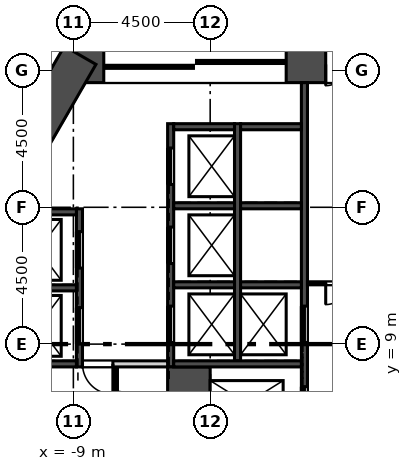
"""IFC4 building model, lengths in metres.
Left out: names, types, materials, properties, quantities, classifications, styles, units other than length and angle.
Written with IfcOpenShell. Run it as: python <this file> out.ifc"""

import sys

from ifc_helpers import new_model, si_unit, direction, frame, frame_2d, origin, place, context, subcontext, project, spatial, rectangle, extrude, element, fill, save


model = new_model("IFC4")
c1 = context("Model", 3, precision=1e-05, world=origin(), true_north=direction((0.0, 1.0)))
c2 = subcontext(c1, "Body", "Model", "MODEL_VIEW")
j1 = project(units=[si_unit("LENGTHUNIT", "METRE"), si_unit("PLANEANGLEUNIT", "RADIAN")], contexts=[c1])
p1 = place(None, origin())
s1 = spatial("IfcSite", under=j1, at=p1, CompositionType="ELEMENT")
p2 = place(p1, origin())
s2 = spatial("IfcBuilding", under=s1, at=p2, CompositionType="ELEMENT")
p3 = place(p2, frame((0.0, 0.0, 132.1)))
s3 = spatial("IfcBuildingStorey", under=s2, at=p3, CompositionType="ELEMENT", Elevation=132.1)
p4 = place(p3, frame((9.296, 18.2, 0.0), z_axis=(0.0, 0.0, 1.0), x_axis=(-1.0, 0.0, 0.0)))
e1 = element("IfcWall", 1, at=p4, inside=s3, PredefinedType="SHEAR", context=c2, shape_type="SweptSolid", body=[
    extrude(rectangle(XDim=18.592, YDim=1.2, at=frame_2d((9.296, 0.0))), origin(), (0.0, 0.0, 1.0), 5.4),
])
p5 = place(p4, frame((8.596, 0.0, 0.0)))
e2 = element("IfcOpeningElement", 2, at=p5, cuts=e1, PredefinedType="OPENING", context=c2, shape_type="SweptSolid", body=[
    extrude(rectangle(XDim=1.4, YDim=2.1, at=frame_2d((0.7, 1.05))), frame((0.0, 0.61, 0.0), z_axis=(0.0, -1.0, 0.0), x_axis=(1.0, 0.0, 0.0)), (0.0, 0.0, 1.0), 1.22),
])
p6 = place(p4, frame((11.296, 0.0, 0.0)))
e3 = element("IfcOpeningElement", 3, at=p6, cuts=e1, PredefinedType="OPENING", context=c2, shape_type="SweptSolid", body=[
    extrude(rectangle(XDim=6.0, YDim=2.4, at=frame_2d((3.0, 1.2))), frame((0.0, 0.61, 0.0), z_axis=(0.0, -1.0, 0.0), x_axis=(1.0, 0.0, 0.0)), (0.0, 0.0, 1.0), 1.22),
])
p7 = place(p4, frame((1.296, 0.0, 0.0)))
e4 = element("IfcOpeningElement", 4, at=p7, cuts=e1, PredefinedType="OPENING", context=c2, shape_type="SweptSolid", body=[
    extrude(rectangle(XDim=6.0, YDim=2.4, at=frame_2d((3.0, 1.2))), frame((0.0, 0.61, 0.0), z_axis=(0.0, -1.0, 0.0), x_axis=(1.0, 0.0, 0.0)), (0.0, 0.0, 1.0), 1.22),
])
p8 = place(p3, frame((-8.777, 18.5, 0.0), z_axis=(0.0, 0.0, 1.0), x_axis=(-0.499998513025, -0.866026262288, 0.0)))
e5 = element("IfcWall", 5, at=p8, inside=s3, PredefinedType="SHEAR", context=c2, shape_type="SweptSolid", body=[
    extrude(rectangle(XDim=9.008, YDim=1.2, at=frame_2d((4.504, 0.0))), origin(), (0.0, 0.0, 1.0), 5.4),
])
p9 = place(p3, frame((-4.353, 51.692, 0.0), z_axis=(0.0, 0.0, 1.0), x_axis=(-0.500000700546, -0.866024999324, 0.0)))
e6 = element("IfcWall", 6, at=p9, inside=s3, PredefinedType="SOLIDWALL", context=c2, shape_type="SweptSolid", body=[
    extrude(rectangle(XDim=50.787, YDim=0.34, at=frame_2d((25.393, 0.0))), origin(), (0.0, 0.0, 1.0), 5.0),
])
p10 = place(p9, frame((3.59, 0.0, 0.9)))
e7 = element("IfcOpeningElement", 7, at=p10, cuts=e6, PredefinedType="OPENING", context=c2, shape_type="SweptSolid", body=[
    extrude(rectangle(XDim=1.885, YDim=3.0, at=frame_2d((0.942, 1.5))), frame((0.0, 0.18, 0.0), z_axis=(0.0, -1.0, 0.0), x_axis=(1.0, 0.0, 0.0)), (0.0, 0.0, 1.0), 0.36),
])
p11 = place(p9, frame((6.59, 0.0, 0.9)))
e8 = element("IfcOpeningElement", 8, at=p11, cuts=e6, PredefinedType="OPENING", context=c2, shape_type="SweptSolid", body=[
    extrude(rectangle(XDim=1.885, YDim=3.0, at=frame_2d((0.942, 1.5))), frame((0.0, 0.18, 0.0), z_axis=(0.0, -1.0, 0.0), x_axis=(1.0, 0.0, 0.0)), (0.0, 0.0, 1.0), 0.36),
])
p12 = place(p9, frame((9.59, 0.0, 0.9)))
e9 = element("IfcOpeningElement", 9, at=p12, cuts=e6, PredefinedType="OPENING", context=c2, shape_type="SweptSolid", body=[
    extrude(rectangle(XDim=1.885, YDim=3.0, at=frame_2d((0.942, 1.5))), frame((0.0, 0.18, 0.0), z_axis=(0.0, -1.0, 0.0), x_axis=(1.0, 0.0, 0.0)), (0.0, 0.0, 1.0), 0.36),
])
p13 = place(p9, frame((12.59, 0.0, 0.9)))
e10 = element("IfcOpeningElement", 10, at=p13, cuts=e6, PredefinedType="OPENING", context=c2, shape_type="SweptSolid", body=[
    extrude(rectangle(XDim=1.885, YDim=3.0, at=frame_2d((0.942, 1.5))), frame((0.0, 0.18, 0.0), z_axis=(0.0, -1.0, 0.0), x_axis=(1.0, 0.0, 0.0)), (0.0, 0.0, 1.0), 0.36),
])
p14 = place(p9, frame((15.59, 0.0, 0.9)))
e11 = element("IfcOpeningElement", 11, at=p14, cuts=e6, PredefinedType="OPENING", context=c2, shape_type="SweptSolid", body=[
    extrude(rectangle(XDim=1.885, YDim=3.0, at=frame_2d((0.942, 1.5))), frame((0.0, 0.18, 0.0), z_axis=(0.0, -1.0, 0.0), x_axis=(1.0, 0.0, 0.0)), (0.0, 0.0, 1.0), 0.36),
])
p15 = place(p9, frame((18.59, 0.0, 0.9)))
e12 = element("IfcOpeningElement", 12, at=p15, cuts=e6, PredefinedType="OPENING", context=c2, shape_type="SweptSolid", body=[
    extrude(rectangle(XDim=1.885, YDim=3.0, at=frame_2d((0.942, 1.5))), frame((0.0, 0.18, 0.0), z_axis=(0.0, -1.0, 0.0), x_axis=(1.0, 0.0, 0.0)), (0.0, 0.0, 1.0), 0.36),
])
p16 = place(p9, frame((21.59, 0.0, 0.9)))
e13 = element("IfcOpeningElement", 13, at=p16, cuts=e6, PredefinedType="OPENING", context=c2, shape_type="SweptSolid", body=[
    extrude(rectangle(XDim=1.885, YDim=3.0, at=frame_2d((0.942, 1.5))), frame((0.0, 0.18, 0.0), z_axis=(0.0, -1.0, 0.0), x_axis=(1.0, 0.0, 0.0)), (0.0, 0.0, 1.0), 0.36),
])
p17 = place(p9, frame((24.59, 0.0, 0.9)))
e14 = element("IfcOpeningElement", 14, at=p17, cuts=e6, PredefinedType="OPENING", context=c2, shape_type="SweptSolid", body=[
    extrude(rectangle(XDim=1.885, YDim=3.0, at=frame_2d((0.942, 1.5))), frame((0.0, 0.18, 0.0), z_axis=(0.0, -1.0, 0.0), x_axis=(1.0, 0.0, 0.0)), (0.0, 0.0, 1.0), 0.36),
])
p18 = place(p9, frame((27.59, 0.0, 0.9)))
e15 = element("IfcOpeningElement", 15, at=p18, cuts=e6, PredefinedType="OPENING", context=c2, shape_type="SweptSolid", body=[
    extrude(rectangle(XDim=1.885, YDim=3.0, at=frame_2d((0.942, 1.5))), frame((0.0, 0.18, 0.0), z_axis=(0.0, -1.0, 0.0), x_axis=(1.0, 0.0, 0.0)), (0.0, 0.0, 1.0), 0.36),
])
p19 = place(p9, frame((30.59, 0.0, 0.9)))
e16 = element("IfcOpeningElement", 16, at=p19, cuts=e6, PredefinedType="OPENING", context=c2, shape_type="SweptSolid", body=[
    extrude(rectangle(XDim=1.885, YDim=3.0, at=frame_2d((0.942, 1.5))), frame((0.0, 0.18, 0.0), z_axis=(0.0, -1.0, 0.0), x_axis=(1.0, 0.0, 0.0)), (0.0, 0.0, 1.0), 0.36),
])
p20 = place(p9, frame((33.59, 0.0, 0.9)))
e17 = element("IfcOpeningElement", 17, at=p20, cuts=e6, PredefinedType="OPENING", context=c2, shape_type="SweptSolid", body=[
    extrude(rectangle(XDim=1.885, YDim=3.0, at=frame_2d((0.942, 1.5))), frame((0.0, 0.18, 0.0), z_axis=(0.0, -1.0, 0.0), x_axis=(1.0, 0.0, 0.0)), (0.0, 0.0, 1.0), 0.36),
])
p21 = place(p9, frame((36.59, 0.0, 0.9)))
e18 = element("IfcOpeningElement", 18, at=p21, cuts=e6, PredefinedType="OPENING", context=c2, shape_type="SweptSolid", body=[
    extrude(rectangle(XDim=1.885, YDim=3.0, at=frame_2d((0.942, 1.5))), frame((0.0, 0.18, 0.0), z_axis=(0.0, -1.0, 0.0), x_axis=(1.0, 0.0, 0.0)), (0.0, 0.0, 1.0), 0.36),
])
p22 = place(p9, frame((39.59, 0.0, 0.9)))
e19 = element("IfcOpeningElement", 19, at=p22, cuts=e6, PredefinedType="OPENING", context=c2, shape_type="SweptSolid", body=[
    extrude(rectangle(XDim=1.885, YDim=3.0, at=frame_2d((0.942, 1.5))), frame((0.0, 0.18, 0.0), z_axis=(0.0, -1.0, 0.0), x_axis=(1.0, 0.0, 0.0)), (0.0, 0.0, 1.0), 0.36),
])
p23 = place(p9, frame((42.59, 0.0, 0.9)))
e20 = element("IfcOpeningElement", 20, at=p23, cuts=e6, PredefinedType="OPENING", context=c2, shape_type="SweptSolid", body=[
    extrude(rectangle(XDim=1.885, YDim=3.0, at=frame_2d((0.942, 1.5))), frame((0.0, 0.18, 0.0), z_axis=(0.0, -1.0, 0.0), x_axis=(1.0, 0.0, 0.0)), (0.0, 0.0, 1.0), 0.36),
])
p24 = place(p9, frame((45.59, 0.0, 0.9)))
e21 = element("IfcOpeningElement", 21, at=p24, cuts=e6, PredefinedType="OPENING", context=c2, shape_type="SweptSolid", body=[
    extrude(rectangle(XDim=1.885, YDim=3.0, at=frame_2d((0.942, 1.5))), frame((0.0, 0.18, 0.0), z_axis=(0.0, -1.0, 0.0), x_axis=(1.0, 0.0, 0.0)), (0.0, 0.0, 1.0), 0.36),
])
p25 = place(p3, frame((-8.8, 8.25, -0.4), z_axis=(0.0, 0.0, 1.0), x_axis=(0.0, 1.0, 0.0)))
e22 = element("IfcWall", 22, at=p25, inside=s3, PredefinedType="SOLIDWALL", context=c2, shape_type="SweptSolid", body=[
    extrude(rectangle(XDim=5.2, YDim=0.2, at=frame_2d((2.6, 0.0))), origin(), (0.0, 0.0, 1.0), 5.4),
])
p26 = place(p25, frame((0.75, 0.0, 0.4)))
e23 = element("IfcOpeningElement", 23, at=p26, cuts=e22, PredefinedType="OPENING", context=c2, shape_type="SweptSolid", body=[
    extrude(rectangle(XDim=1.2, YDim=2.1, at=frame_2d((0.6, 1.05))), frame((0.0, 0.11, 0.0), z_axis=(0.0, -1.0, 0.0), x_axis=(1.0, 0.0, 0.0)), (0.0, 0.0, 1.0), 0.22),
])
p27 = place(p25, frame((3.25, 0.0, 0.4)))
e24 = element("IfcOpeningElement", 24, at=p27, cuts=e22, PredefinedType="OPENING", context=c2, shape_type="SweptSolid", body=[
    extrude(rectangle(XDim=1.2, YDim=2.1, at=frame_2d((0.6, 1.05))), frame((0.0, 0.11, 0.0), z_axis=(0.0, -1.0, 0.0), x_axis=(1.0, 0.0, 0.0)), (0.0, 0.0, 1.0), 0.22),
])
p28 = place(p3, frame((-5.8, 8.25, -0.4), z_axis=(0.0, 0.0, 1.0), x_axis=(0.0, 1.0, 0.0)))
e25 = element("IfcWall", 25, at=p28, inside=s3, PredefinedType="SOLIDWALL", context=c2, shape_type="SweptSolid", body=[
    extrude(rectangle(XDim=8.0, YDim=0.2, at=frame_2d((4.0, 0.0))), origin(), (0.0, 0.0, 1.0), 5.4),
])
p29 = place(p28, frame((0.8, 0.0, 0.4)))
e26 = element("IfcOpeningElement", 26, at=p29, cuts=e25, PredefinedType="OPENING", context=c2, shape_type="SweptSolid", body=[
    extrude(rectangle(XDim=1.2, YDim=2.1, at=frame_2d((0.6, 1.05))), frame((0.0, 0.11, 0.0), z_axis=(0.0, -1.0, 0.0), x_axis=(1.0, 0.0, 0.0)), (0.0, 0.0, 1.0), 0.22),
])
p30 = place(p28, frame((3.4, 0.0, 0.4)))
e27 = element("IfcOpeningElement", 27, at=p30, cuts=e25, PredefinedType="OPENING", context=c2, shape_type="SweptSolid", body=[
    extrude(rectangle(XDim=1.2, YDim=2.1, at=frame_2d((0.6, 1.05))), frame((0.0, 0.11, 0.0), z_axis=(0.0, -1.0, 0.0), x_axis=(1.0, 0.0, 0.0)), (0.0, 0.0, 1.0), 0.22),
])
p31 = place(p28, frame((6.0, 0.0, 0.4)))
e28 = element("IfcOpeningElement", 28, at=p31, cuts=e25, PredefinedType="OPENING", context=c2, shape_type="SweptSolid", body=[
    extrude(rectangle(XDim=1.2, YDim=2.1, at=frame_2d((0.6, 1.05))), frame((0.0, 0.11, 0.0), z_axis=(0.0, -1.0, 0.0), x_axis=(1.0, 0.0, 0.0)), (0.0, 0.0, 1.0), 0.22),
])
p32 = place(p3, frame((-3.6, 8.45, -0.4), z_axis=(0.0, 0.0, 1.0), x_axis=(0.0, 1.0, 0.0)))
e29 = element("IfcWall", 29, at=p32, inside=s3, PredefinedType="SOLIDWALL", context=c2, shape_type="SweptSolid", body=[
    extrude(rectangle(XDim=7.8, YDim=0.2, at=frame_2d((3.9, 0.0))), origin(), (0.0, 0.0, 1.0), 5.4),
])
p33 = place(p3, frame((-1.4, 5.85, -0.4), z_axis=(0.0, 0.0, 1.0), x_axis=(0.0, 1.0, 0.0)))
e30 = element("IfcWall", 30, at=p33, inside=s3, PredefinedType="SOLIDWALL", context=c2, shape_type="SweptSolid", body=[
    extrude(rectangle(XDim=11.75, YDim=0.2, at=frame_2d((5.875, 0.0))), origin(), (0.0, 0.0, 1.0), 5.4),
])
p34 = place(p33, frame((3.2, 0.0, 0.4)))
e31 = element("IfcOpeningElement", 31, at=p34, cuts=e30, PredefinedType="OPENING", context=c2, shape_type="SweptSolid", body=[
    extrude(rectangle(XDim=1.2, YDim=2.1, at=frame_2d((0.6, 1.05))), frame((0.0, 0.11, 0.0), z_axis=(0.0, -1.0, 0.0), x_axis=(1.0, 0.0, 0.0)), (0.0, 0.0, 1.0), 0.22),
])
p35 = place(p33, frame((0.65, 0.0, 0.4)))
e32 = element("IfcOpeningElement", 32, at=p35, cuts=e30, PredefinedType="OPENING", context=c2, shape_type="SweptSolid", body=[
    extrude(rectangle(XDim=1.1, YDim=2.1, at=frame_2d((0.55, 1.05))), frame((0.0, 0.11, 0.0), z_axis=(0.0, -1.0, 0.0), x_axis=(1.0, 0.0, 0.0)), (0.0, 0.0, 1.0), 0.22),
])
p36 = place(p3, frame((-5.2, 5.85, -0.4), z_axis=(0.0, 0.0, 1.0), x_axis=(0.0, 1.0, 0.0)))
e33 = element("IfcWall", 33, at=p36, inside=s3, PredefinedType="SOLIDWALL", context=c2, shape_type="SweptSolid", body=[
    extrude(rectangle(XDim=2.4, YDim=1.4, at=frame_2d((1.2, 0.0))), origin(), (0.0, 0.0, 1.0), 5.4),
])
p37 = place(p3, frame((-10.9, 8.35, -0.4), z_axis=(0.0, 0.0, 1.0), x_axis=(1.0, 0.0, 0.0)))
e34 = element("IfcWall", 34, at=p37, inside=s3, PredefinedType="SOLIDWALL", context=c2, shape_type="SweptSolid", body=[
    extrude(rectangle(XDim=2.0, YDim=0.2, at=frame_2d((1.0, 0.0))), origin(), (0.0, 0.0, 1.0), 5.4),
])
p38 = place(p3, frame((-5.7, 8.35, -0.4), z_axis=(0.0, 0.0, 1.0), x_axis=(1.0, 0.0, 0.0)))
e35 = element("IfcWall", 35, at=p38, inside=s3, PredefinedType="SOLIDWALL", context=c2, shape_type="SweptSolid", body=[
    extrude(rectangle(XDim=4.2, YDim=0.2, at=frame_2d((2.1, 0.0))), origin(), (0.0, 0.0, 1.0), 5.4),
])
for number, where, z_axis, x_axis in (
    (36, (-10.9, 10.85, -0.4), (0.0, 0.0, 1.0), (1.0, 0.0, 0.0)),
    (37, (-10.9, 13.35, -0.4), (0.0, 0.0, 1.0), (1.0, 0.0, 0.0)),
    (38, (-5.7, 10.95, -0.4), (0.0, 0.0, 1.0), (1.0, 0.0, 0.0)),
    (39, (-5.7, 13.55, -0.4), (0.0, 0.0, 1.0), (1.0, 0.0, 0.0)),
    (40, (-5.7, 16.15, -0.4), (0.0, 0.0, 1.0), (1.0, 0.0, 0.0)),
    (41, (-3.5, 10.95, -0.4), (0.0, 0.0, 1.0), (1.0, 0.0, 0.0)),
    (42, (-3.5, 13.55, -0.4), (0.0, 0.0, 1.0), (1.0, 0.0, 0.0)),
    (43, (-3.5, 16.15, -0.4), (0.0, 0.0, 1.0), (1.0, 0.0, 0.0)),
):
    element("IfcWall", number, at=place(p3, frame(where, z_axis=z_axis, x_axis=x_axis)), inside=s3, PredefinedType="SOLIDWALL", context=c2, shape_type="SweptSolid", body=[
        extrude(rectangle(XDim=2.0, YDim=0.2, at=frame_2d((1.0, 0.0))), origin(), (0.0, 0.0, 1.0), 5.4),
    ])
p39 = place(p3, frame((-7.6, 5.85, 0.0), z_axis=(0.0, 0.0, 1.0), x_axis=(0.0, 1.0, 0.0)))
e44 = element("IfcWall", 44, at=p39, inside=s3, PredefinedType="PARTITIONING", context=c2, shape_type="SweptSolid", body=[
    extrude(rectangle(XDim=2.4, YDim=0.1, at=frame_2d((1.2, 0.0))), origin(), (0.0, 0.0, 1.0), 5.0),
])
p40 = place(p39, frame((0.7, 0.0, 0.0)))
e45 = element("IfcOpeningElement", 45, at=p40, cuts=e44, PredefinedType="OPENING", context=c2, shape_type="SweptSolid", body=[
    extrude(rectangle(XDim=0.9, YDim=2.1, at=frame_2d((0.45, 1.05))), frame((0.0, 0.06, 0.0), z_axis=(0.0, -1.0, 0.0), x_axis=(1.0, 0.0, 0.0)), (0.0, 0.0, 1.0), 0.12),
])
p41 = place(p3, frame((-8.7, 8.35, 0.0), z_axis=(0.0, 0.0, 1.0), x_axis=(1.0, 0.0, 0.0)))
e46 = element("IfcWall", 46, at=p41, inside=s3, PredefinedType="SOLIDWALL", context=c2, shape_type="SweptSolid", body=[
    extrude(rectangle(XDim=2.8, YDim=0.2, at=frame_2d((1.4, 0.0))), origin(), (0.0, 0.0, 1.0), 5.0),
])
p42 = place(p41, origin())
e47 = element("IfcOpeningElement", 47, at=p42, cuts=e46, PredefinedType="OPENING", context=c2, shape_type="SweptSolid", body=[
    extrude(rectangle(XDim=1.0, YDim=2.1, at=frame_2d((0.5, 1.05))), frame((0.0, 0.11, 0.0), z_axis=(0.0, -1.0, 0.0), x_axis=(1.0, 0.0, 0.0)), (0.0, 0.0, 1.0), 0.22),
])
p43 = place(p3, frame((-1.3, 11.0, 0.0), z_axis=(0.0, 0.0, 1.0), x_axis=(1.0, 0.0, 0.0)))
e48 = element("IfcWall", 48, at=p43, inside=s3, PredefinedType="PARTITIONING", context=c2, shape_type="SweptSolid", body=[
    extrude(rectangle(XDim=2.6, YDim=0.1, at=frame_2d((1.3, 0.0))), origin(), (0.0, 0.0, 1.0), 5.0),
])
p44 = place(p43, frame((0.6, 0.0, 0.0)))
e49 = element("IfcOpeningElement", 49, at=p44, cuts=e48, PredefinedType="OPENING", context=c2, shape_type="SweptSolid", body=[
    extrude(rectangle(XDim=1.4, YDim=2.1, at=frame_2d((0.7, 1.05))), frame((0.0, 0.06, 0.0), z_axis=(0.0, -1.0, 0.0), x_axis=(1.0, 0.0, 0.0)), (0.0, 0.0, 1.0), 0.12),
])
p45 = place(p26, origin())
e50 = element("IfcDoor", 50, at=p45, inside=s3, OperationType="SLIDING_TO_LEFT", PredefinedType="DOOR", context=c2, shape_type="SweptSolid", body=[
    extrude(rectangle(XDim=1.2, YDim=2.1, at=frame_2d((0.6, 1.05))), frame((0.0, 0.025, 0.0), z_axis=(0.0, -1.0, 0.0), x_axis=(1.0, 0.0, 0.0)), (0.0, 0.0, 1.0), 0.05),
])
fill(e23, e50)
p46 = place(p27, origin())
e51 = element("IfcDoor", 51, at=p46, inside=s3, OperationType="SLIDING_TO_LEFT", PredefinedType="DOOR", context=c2, shape_type="SweptSolid", body=[
    extrude(rectangle(XDim=1.2, YDim=2.1, at=frame_2d((0.6, 1.05))), frame((0.0, 0.025, 0.0), z_axis=(0.0, -1.0, 0.0), x_axis=(1.0, 0.0, 0.0)), (0.0, 0.0, 1.0), 0.05),
])
fill(e24, e51)
p47 = place(p29, origin())
e52 = element("IfcDoor", 52, at=p47, inside=s3, OperationType="SLIDING_TO_LEFT", PredefinedType="DOOR", context=c2, shape_type="SweptSolid", body=[
    extrude(rectangle(XDim=1.2, YDim=2.1, at=frame_2d((0.6, 1.05))), frame((0.0, 0.025, 0.0), z_axis=(0.0, -1.0, 0.0), x_axis=(1.0, 0.0, 0.0)), (0.0, 0.0, 1.0), 0.05),
])
fill(e26, e52)
p48 = place(p30, origin())
e53 = element("IfcDoor", 53, at=p48, inside=s3, OperationType="SLIDING_TO_LEFT", PredefinedType="DOOR", context=c2, shape_type="SweptSolid", body=[
    extrude(rectangle(XDim=1.2, YDim=2.1, at=frame_2d((0.6, 1.05))), frame((0.0, 0.025, 0.0), z_axis=(0.0, -1.0, 0.0), x_axis=(1.0, 0.0, 0.0)), (0.0, 0.0, 1.0), 0.05),
])
fill(e27, e53)
p49 = place(p31, origin())
e54 = element("IfcDoor", 54, at=p49, inside=s3, OperationType="SLIDING_TO_LEFT", PredefinedType="DOOR", context=c2, shape_type="SweptSolid", body=[
    extrude(rectangle(XDim=1.2, YDim=2.1, at=frame_2d((0.6, 1.05))), frame((0.0, 0.025, 0.0), z_axis=(0.0, -1.0, 0.0), x_axis=(1.0, 0.0, 0.0)), (0.0, 0.0, 1.0), 0.05),
])
fill(e28, e54)
p50 = place(p34, origin())
e55 = element("IfcDoor", 55, at=p50, inside=s3, OperationType="SLIDING_TO_LEFT", PredefinedType="DOOR", context=c2, shape_type="SweptSolid", body=[
    extrude(rectangle(XDim=1.2, YDim=2.1, at=frame_2d((0.6, 1.05))), frame((0.0, 0.025, 0.0), z_axis=(0.0, -1.0, 0.0), x_axis=(1.0, 0.0, 0.0)), (0.0, 0.0, 1.0), 0.05),
])
fill(e31, e55)
p51 = place(p35, origin())
e56 = element("IfcDoor", 56, at=p51, inside=s3, OperationType="SLIDING_TO_RIGHT", PredefinedType="DOOR", context=c2, shape_type="SweptSolid", body=[
    extrude(rectangle(XDim=1.1, YDim=2.1, at=frame_2d((0.55, 1.05))), frame((0.0, 0.025, 0.0), z_axis=(0.0, -1.0, 0.0), x_axis=(1.0, 0.0, 0.0)), (0.0, 0.0, 1.0), 0.05),
])
fill(e32, e56)
p52 = place(p42, frame((1.0, 0.0, 0.0), z_axis=(0.0, 0.0, 1.0), x_axis=(-1.0, 0.0, 0.0)))
e57 = element("IfcDoor", 57, at=p52, inside=s3, OperationType="SINGLE_SWING_LEFT", PredefinedType="DOOR", context=c2, shape_type="SweptSolid", body=[
    extrude(rectangle(XDim=1.0, YDim=2.1, at=frame_2d((0.5, 1.05))), frame((0.0, 0.025, 0.0), z_axis=(0.0, -1.0, 0.0), x_axis=(1.0, 0.0, 0.0)), (0.0, 0.0, 1.0), 0.05),
])
fill(e47, e57)
p53 = place(p44, frame((1.4, 0.0, 0.0), z_axis=(0.0, 0.0, 1.0), x_axis=(-1.0, 0.0, 0.0)))
e58 = element("IfcDoor", 58, at=p53, inside=s3, OperationType="DOUBLE_DOOR_SINGLE_SWING", PredefinedType="DOOR", context=c2, shape_type="SweptSolid", body=[
    extrude(rectangle(XDim=1.4, YDim=2.1, at=frame_2d((0.7, 1.05))), frame((0.0, 0.025, 0.0), z_axis=(0.0, -1.0, 0.0), x_axis=(1.0, 0.0, 0.0)), (0.0, 0.0, 1.0), 0.05),
])
fill(e49, e58)
p54 = place(p5, origin())
e59 = element("IfcDoor", 59, at=p54, inside=s3, OperationType="DOUBLE_DOOR_SINGLE_SWING", PredefinedType="DOOR", context=c2, shape_type="SweptSolid", body=[
    extrude(rectangle(XDim=1.4, YDim=2.1, at=frame_2d((0.7, 1.05))), frame((0.0, 0.025, 0.0), z_axis=(0.0, -1.0, 0.0), x_axis=(1.0, 0.0, 0.0)), (0.0, 0.0, 1.0), 0.05),
])
fill(e2, e59)
p55 = place(p6, origin())
e60 = element("IfcDoor", 60, at=p55, inside=s3, OperationType="DOUBLE_DOOR_SLIDING", PredefinedType="DOOR", context=c2, shape_type="SweptSolid", body=[
    extrude(rectangle(XDim=6.0, YDim=2.4, at=frame_2d((3.0, 1.2))), frame((0.0, 0.025, 0.0), z_axis=(0.0, -1.0, 0.0), x_axis=(1.0, 0.0, 0.0)), (0.0, 0.0, 1.0), 0.05),
])
fill(e3, e60)
save(model, sys.argv[1])
